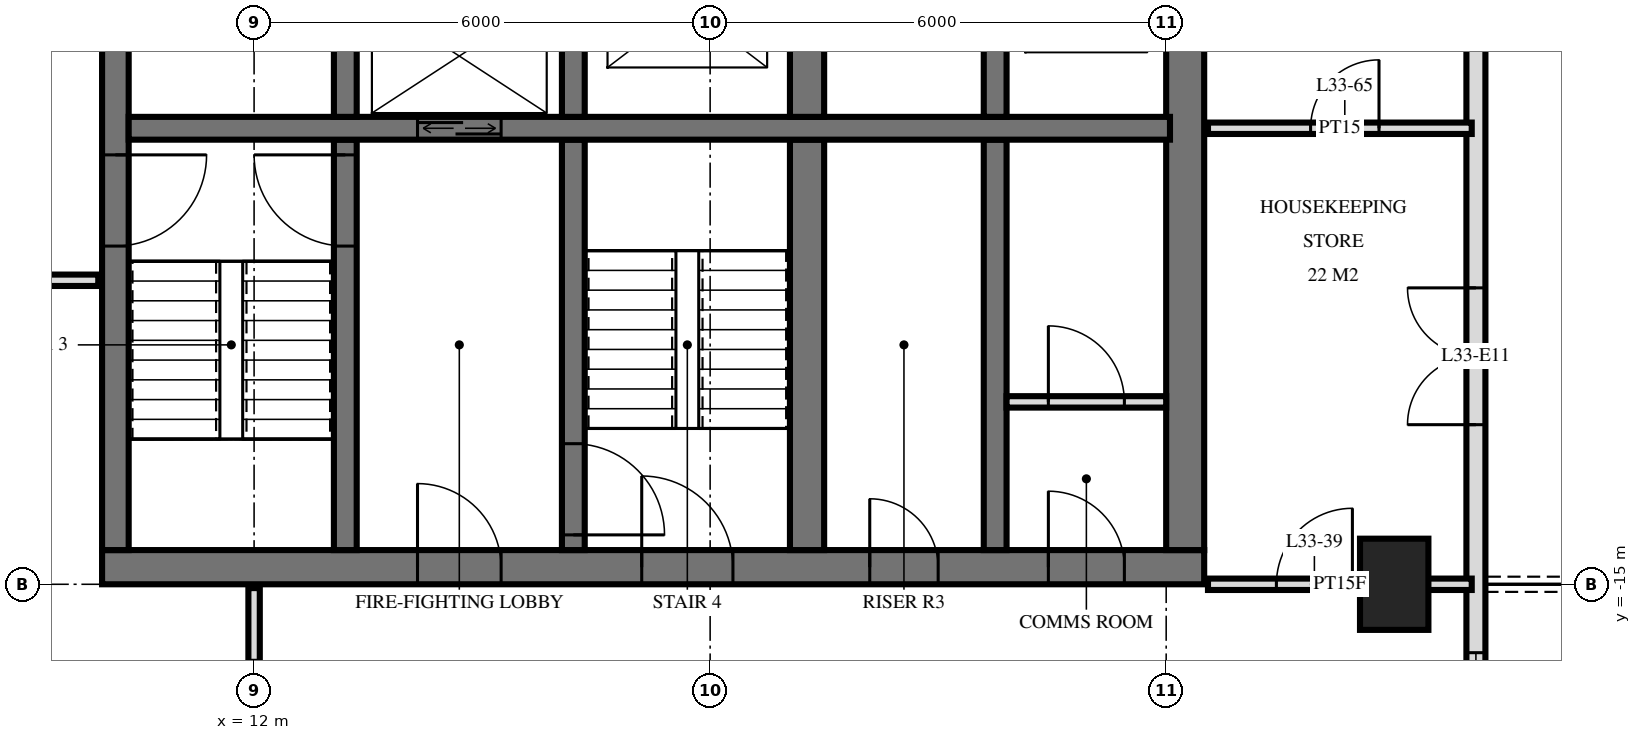
"""IFC4 building model, lengths in metres.
Left out: names, types, materials, properties, quantities, classifications, styles, units other than length and angle.
Written with IfcOpenShell. Run it as: python <this file> out.ifc"""

import sys

from ifc_helpers import new_model, si_unit, direction, frame, frame_2d, origin, origin_2d, place, context, subcontext, project, spatial, rectangle, extrude, element, fill, save


model = new_model("IFC4")
c1 = context("Model", 3, precision=1e-05, world=origin(), true_north=direction((0.0, 1.0)))
c2 = subcontext(c1, "Body", "Model", "MODEL_VIEW")
j1 = project(units=[si_unit("LENGTHUNIT", "METRE"), si_unit("PLANEANGLEUNIT", "RADIAN")], contexts=[c1])
p1 = place(None, origin())
s1 = spatial("IfcSite", under=j1, at=p1, CompositionType="ELEMENT")
p2 = place(p1, origin())
s2 = spatial("IfcBuilding", under=s1, at=p2, CompositionType="ELEMENT")
p3 = place(p2, frame((0.0, 0.0, 130.8)))
s3 = spatial("IfcBuildingStorey", under=s2, at=p3, CompositionType="ELEMENT", Elevation=130.8)
p4 = place(p3, frame((27.0, -15.0, 0.0), z_axis=(0.0, 0.0, 1.0), x_axis=(0.0, 1.0, 0.0)))
e1 = element("IfcColumn", 1, at=p4, inside=s3, PredefinedType="COLUMN", context=c2, shape_type="SweptSolid", body=[
    extrude(rectangle(XDim=1.2, YDim=0.9, at=origin_2d()), origin(), (0.0, 0.0, 1.0), 3.6),
])
p5 = place(p3, frame((10.0, -14.775, 0.0), z_axis=(0.0, 0.0, 1.0), x_axis=(1.0, 0.0, 0.0)))
e2 = element("IfcWall", 2, at=p5, inside=s3, PredefinedType="SHEAR", context=c2, shape_type="SweptSolid", body=[
    extrude(rectangle(XDim=14.5, YDim=0.45, at=frame_2d((7.25, 0.0))), origin(), (0.0, 0.0, 1.0), 3.6),
])
p6 = place(p5, frame((7.1, 0.0, 0.0)))
e3 = element("IfcOpeningElement", 3, at=p6, cuts=e2, PredefinedType="OPENING", context=c2, shape_type="SweptSolid", body=[
    extrude(rectangle(XDim=1.2, YDim=2.1, at=frame_2d((0.6, 1.05))), frame((0.0, 0.235, 0.0), z_axis=(0.0, -1.0, 0.0), x_axis=(1.0, 0.0, 0.0)), (0.0, 0.0, 1.0), 0.47),
])
p7 = place(p5, frame((4.15, 0.0, 0.0)))
e4 = element("IfcOpeningElement", 4, at=p7, cuts=e2, PredefinedType="OPENING", context=c2, shape_type="SweptSolid", body=[
    extrude(rectangle(XDim=1.1, YDim=2.1, at=frame_2d((0.55, 1.05))), frame((0.0, 0.235, 0.0), z_axis=(0.0, -1.0, 0.0), x_axis=(1.0, 0.0, 0.0)), (0.0, 0.0, 1.0), 0.47),
])
p8 = place(p5, frame((10.1, 0.0, 0.0)))
e5 = element("IfcOpeningElement", 5, at=p8, cuts=e2, PredefinedType="OPENING", context=c2, shape_type="SweptSolid", body=[
    extrude(rectangle(XDim=0.9, YDim=2.1, at=frame_2d((0.45, 1.05))), frame((0.0, 0.235, 0.0), z_axis=(0.0, -1.0, 0.0), x_axis=(1.0, 0.0, 0.0)), (0.0, 0.0, 1.0), 0.47),
])
p9 = place(p5, frame((12.45, 0.0, 0.0)))
e6 = element("IfcOpeningElement", 6, at=p9, cuts=e2, PredefinedType="OPENING", context=c2, shape_type="SweptSolid", body=[
    extrude(rectangle(XDim=1.0, YDim=2.1, at=frame_2d((0.5, 1.05))), frame((0.0, 0.235, 0.0), z_axis=(0.0, -1.0, 0.0), x_axis=(1.0, 0.0, 0.0)), (0.0, 0.0, 1.0), 0.47),
])
p10 = place(p3, frame((10.175, -14.55, 0.0), z_axis=(0.0, 0.0, 1.0), x_axis=(0.0, 1.0, 0.0)))
e7 = element("IfcWall", 7, at=p10, inside=s3, PredefinedType="SHEAR", context=c2, shape_type="SweptSolid", body=[
    extrude(rectangle(XDim=14.1, YDim=0.35, at=frame_2d((7.05, 0.0))), origin(), (0.0, 0.0, 1.0), 3.6),
])
p11 = place(p10, frame((8.4, 0.0, 0.0)))
e8 = element("IfcOpeningElement", 8, at=p11, cuts=e7, PredefinedType="OPENING", context=c2, shape_type="SweptSolid", body=[
    extrude(rectangle(XDim=1.4, YDim=2.4, at=frame_2d((0.7, 1.2))), frame((0.0, 0.185, 0.0), z_axis=(0.0, -1.0, 0.0), x_axis=(1.0, 0.0, 0.0)), (0.0, 0.0, 1.0), 0.37),
])
p12 = place(p10, frame((10.0, 0.0, 0.0)))
e9 = element("IfcOpeningElement", 9, at=p12, cuts=e7, PredefinedType="OPENING", context=c2, shape_type="SweptSolid", body=[
    extrude(rectangle(XDim=1.4, YDim=2.4, at=frame_2d((0.7, 1.2))), frame((0.0, 0.185, 0.0), z_axis=(0.0, -1.0, 0.0), x_axis=(1.0, 0.0, 0.0)), (0.0, 0.0, 1.0), 0.37),
])
p13 = place(p10, frame((4.0, 0.0, 0.0)))
e10 = element("IfcOpeningElement", 10, at=p13, cuts=e7, PredefinedType="OPENING", context=c2, shape_type="SweptSolid", body=[
    extrude(rectangle(XDim=1.2, YDim=2.1, at=frame_2d((0.6, 1.05))), frame((0.0, 0.185, 0.0), z_axis=(0.0, -1.0, 0.0), x_axis=(1.0, 0.0, 0.0)), (0.0, 0.0, 1.0), 0.37),
])
p14 = place(p3, frame((24.25, -14.55, 0.0), z_axis=(0.0, 0.0, 1.0), x_axis=(0.0, 1.0, 0.0)))
e11 = element("IfcWall", 11, at=p14, inside=s3, PredefinedType="SHEAR", context=c2, shape_type="SweptSolid", body=[
    extrude(rectangle(XDim=14.1, YDim=0.5, at=frame_2d((7.05, 0.0))), origin(), (0.0, 0.0, 1.0), 3.6),
])
p15 = place(p3, frame((10.35, -9.0, 0.0), z_axis=(0.0, 0.0, 1.0), x_axis=(1.0, 0.0, 0.0)))
e12 = element("IfcWall", 12, at=p15, inside=s3, PredefinedType="SHEAR", context=c2, shape_type="SweptSolid", body=[
    extrude(rectangle(XDim=13.7, YDim=0.3, at=frame_2d((6.85, 0.0))), origin(), (0.0, 0.0, 1.0), 3.6),
])
p16 = place(p15, frame((3.8, 0.0, 0.0)))
e13 = element("IfcOpeningElement", 13, at=p16, cuts=e12, PredefinedType="OPENING", context=c2, shape_type="SweptSolid", body=[
    extrude(rectangle(XDim=1.1, YDim=2.1, at=frame_2d((0.55, 1.05))), frame((0.0, 0.16, 0.0), z_axis=(0.0, -1.0, 0.0), x_axis=(1.0, 0.0, 0.0)), (0.0, 0.0, 1.0), 0.32),
])
p17 = place(p3, frame((13.2, -8.85, 0.0), z_axis=(0.0, 0.0, 1.0), x_axis=(0.0, 1.0, 0.0)))
e14 = element("IfcWall", 14, at=p17, inside=s3, PredefinedType="SHEAR", context=c2, shape_type="SweptSolid", body=[
    extrude(rectangle(XDim=2.3, YDim=0.3, at=frame_2d((1.15, 0.0))), origin(), (0.0, 0.0, 1.0), 3.6),
])
p18 = place(p3, frame((13.2, -14.55, 0.0), z_axis=(0.0, 0.0, 1.0), x_axis=(0.0, 1.0, 0.0)))
e15 = element("IfcWall", 15, at=p18, inside=s3, PredefinedType="SHEAR", context=c2, shape_type="SweptSolid", body=[
    extrude(rectangle(XDim=5.4, YDim=0.3, at=frame_2d((2.7, 0.0))), origin(), (0.0, 0.0, 1.0), 3.6),
])
p19 = place(p18, frame((4.0, 0.0, 0.0)))
e16 = element("IfcOpeningElement", 16, at=p19, cuts=e15, PredefinedType="OPENING", context=c2, shape_type="SweptSolid", body=[
    extrude(rectangle(XDim=1.2, YDim=2.1, at=frame_2d((0.6, 1.05))), frame((0.0, 0.16, 0.0), z_axis=(0.0, -1.0, 0.0), x_axis=(1.0, 0.0, 0.0)), (0.0, 0.0, 1.0), 0.32),
])
p20 = place(p3, frame((16.2, -8.85, 0.0), z_axis=(0.0, 0.0, 1.0), x_axis=(0.0, 1.0, 0.0)))
e17 = element("IfcWall", 17, at=p20, inside=s3, PredefinedType="SHEAR", context=c2, shape_type="SweptSolid", body=[
    extrude(rectangle(XDim=2.3, YDim=0.3, at=frame_2d((1.15, 0.0))), origin(), (0.0, 0.0, 1.0), 3.6),
])
p21 = place(p3, frame((16.2, -14.55, 0.0), z_axis=(0.0, 0.0, 1.0), x_axis=(0.0, 1.0, 0.0)))
e18 = element("IfcWall", 18, at=p21, inside=s3, PredefinedType="SHEAR", context=c2, shape_type="SweptSolid", body=[
    extrude(rectangle(XDim=5.4, YDim=0.3, at=frame_2d((2.7, 0.0))), origin(), (0.0, 0.0, 1.0), 3.6),
])
p22 = place(p21, frame((0.2, 0.0, 0.0)))
e19 = element("IfcOpeningElement", 19, at=p22, cuts=e18, PredefinedType="OPENING", context=c2, shape_type="SweptSolid", body=[
    extrude(rectangle(XDim=1.2, YDim=2.1, at=frame_2d((0.6, 1.05))), frame((0.0, 0.16, 0.0), z_axis=(0.0, -1.0, 0.0), x_axis=(1.0, 0.0, 0.0)), (0.0, 0.0, 1.0), 0.32),
])
p23 = place(p3, frame((19.275, -8.85, 0.0), z_axis=(0.0, 0.0, 1.0), x_axis=(0.0, 1.0, 0.0)))
e20 = element("IfcWall", 20, at=p23, inside=s3, PredefinedType="SHEAR", context=c2, shape_type="SweptSolid", body=[
    extrude(rectangle(XDim=2.3, YDim=0.45, at=frame_2d((1.15, 0.0))), origin(), (0.0, 0.0, 1.0), 3.6),
])
p24 = place(p3, frame((19.275, -14.55, 0.0), z_axis=(0.0, 0.0, 1.0), x_axis=(0.0, 1.0, 0.0)))
e21 = element("IfcWall", 21, at=p24, inside=s3, PredefinedType="SHEAR", context=c2, shape_type="SweptSolid", body=[
    extrude(rectangle(XDim=5.4, YDim=0.45, at=frame_2d((2.7, 0.0))), origin(), (0.0, 0.0, 1.0), 3.6),
])
p25 = place(p3, frame((21.75, -8.85, 0.0), z_axis=(0.0, 0.0, 1.0), x_axis=(0.0, 1.0, 0.0)))
e22 = element("IfcWall", 22, at=p25, inside=s3, PredefinedType="SHEAR", context=c2, shape_type="SweptSolid", body=[
    extrude(rectangle(XDim=2.3, YDim=0.3, at=frame_2d((1.15, 0.0))), origin(), (0.0, 0.0, 1.0), 3.6),
])
p26 = place(p3, frame((21.75, -14.55, 0.0), z_axis=(0.0, 0.0, 1.0), x_axis=(0.0, 1.0, 0.0)))
e23 = element("IfcWall", 23, at=p26, inside=s3, PredefinedType="SHEAR", context=c2, shape_type="SweptSolid", body=[
    extrude(rectangle(XDim=5.4, YDim=0.3, at=frame_2d((2.7, 0.0))), origin(), (0.0, 0.0, 1.0), 3.6),
])
p27 = place(p3, frame((28.075, -29.275, 0.0), z_axis=(0.0, 0.0, 1.0), x_axis=(0.0, 1.0, 0.0)))
e24 = element("IfcWall", 24, at=p27, inside=s3, PredefinedType="SOLIDWALL", context=c2, shape_type="SweptSolid", body=[
    extrude(rectangle(XDim=25.951, YDim=0.25, at=frame_2d((12.975, 0.0))), origin(), (0.0, 0.0, 1.0), 3.32),
])
p28 = place(p27, frame((0.575, 0.0, 0.0)))
e25 = element("IfcOpeningElement", 25, at=p28, cuts=e24, PredefinedType="OPENING", context=c2, shape_type="SweptSolid", body=[
    extrude(rectangle(XDim=1.8, YDim=2.4, at=frame_2d((0.9, 1.2))), frame((0.0, 0.135, 0.0), z_axis=(0.0, -1.0, 0.0), x_axis=(1.0, 0.0, 0.0)), (0.0, 0.0, 1.0), 0.27),
])
p29 = place(p27, frame((3.325, 0.0, 0.3)))
e26 = element("IfcOpeningElement", 26, at=p29, cuts=e24, PredefinedType="OPENING", context=c2, shape_type="SweptSolid", body=[
    extrude(rectangle(XDim=1.8, YDim=2.1, at=frame_2d((0.9, 1.05))), frame((0.0, 0.135, 0.0), z_axis=(0.0, -1.0, 0.0), x_axis=(1.0, 0.0, 0.0)), (0.0, 0.0, 1.0), 0.27),
])
p30 = place(p27, frame((8.275, 0.0, 0.0)))
e27 = element("IfcOpeningElement", 27, at=p30, cuts=e24, PredefinedType="OPENING", context=c2, shape_type="SweptSolid", body=[
    extrude(rectangle(XDim=1.8, YDim=2.4, at=frame_2d((0.9, 1.2))), frame((0.0, 0.135, 0.0), z_axis=(0.0, -1.0, 0.0), x_axis=(1.0, 0.0, 0.0)), (0.0, 0.0, 1.0), 0.27),
])
p31 = place(p27, frame((12.175, 0.0, 0.3)))
e28 = element("IfcOpeningElement", 28, at=p31, cuts=e24, PredefinedType="OPENING", context=c2, shape_type="SweptSolid", body=[
    extrude(rectangle(XDim=1.2, YDim=2.1, at=frame_2d((0.6, 1.05))), frame((0.0, 0.135, 0.0), z_axis=(0.0, -1.0, 0.0), x_axis=(1.0, 0.0, 0.0)), (0.0, 0.0, 1.0), 0.27),
])
p32 = place(p27, frame((16.375, 0.0, 0.0)))
e29 = element("IfcOpeningElement", 29, at=p32, cuts=e24, PredefinedType="OPENING", context=c2, shape_type="SweptSolid", body=[
    extrude(rectangle(XDim=1.8, YDim=2.4, at=frame_2d((0.9, 1.2))), frame((0.0, 0.135, 0.0), z_axis=(0.0, -1.0, 0.0), x_axis=(1.0, 0.0, 0.0)), (0.0, 0.0, 1.0), 0.27),
])
p33 = place(p3, frame((21.9, -12.6, 0.0), z_axis=(0.0, 0.0, 1.0), x_axis=(1.0, 0.0, 0.0)))
e30 = element("IfcWall", 30, at=p33, inside=s3, PredefinedType="PARTITIONING", context=c2, shape_type="SweptSolid", body=[
    extrude(rectangle(XDim=2.1, YDim=0.15, at=frame_2d((1.05, 0.0))), origin(), (0.0, 0.0, 1.0), 3.3),
])
p34 = place(p33, frame((0.55, 0.0, 0.0)))
e31 = element("IfcOpeningElement", 31, at=p34, cuts=e30, PredefinedType="OPENING", context=c2, shape_type="SweptSolid", body=[
    extrude(rectangle(XDim=1.0, YDim=2.1, at=frame_2d((0.5, 1.05))), frame((0.0, 0.085, 0.0), z_axis=(0.0, -1.0, 0.0), x_axis=(1.0, 0.0, 0.0)), (0.0, 0.0, 1.0), 0.17),
])
p35 = place(p3, frame((12.0, -18.0, 0.0), z_axis=(0.0, 0.0, 1.0), x_axis=(0.0, 1.0, 0.0)))
e32 = element("IfcWall", 32, at=p35, inside=s3, PredefinedType="PARTITIONING", context=c2, shape_type="SweptSolid", body=[
    extrude(rectangle(XDim=2.95, YDim=0.15, at=frame_2d((1.475, 0.0))), origin(), (0.0, 0.0, 1.0), 3.32),
])
p36 = place(p35, frame((1.0, 0.0, 0.0)))
e33 = element("IfcOpeningElement", 33, at=p36, cuts=e32, PredefinedType="OPENING", context=c2, shape_type="SweptSolid", body=[
    extrude(rectangle(XDim=1.0, YDim=2.1, at=frame_2d((0.5, 1.05))), frame((0.0, 0.085, 0.0), z_axis=(0.0, -1.0, 0.0), x_axis=(1.0, 0.0, 0.0)), (0.0, 0.0, 1.0), 0.17),
])
p37 = place(p3, frame((24.55, -15.0, 0.0), z_axis=(0.0, 0.0, 1.0), x_axis=(1.0, 0.0, 0.0)))
e34 = element("IfcWall", 34, at=p37, inside=s3, PredefinedType="PARTITIONING", context=c2, shape_type="SweptSolid", body=[
    extrude(rectangle(XDim=3.47, YDim=0.15, at=frame_2d((1.735, 0.0))), origin(), (0.0, 0.0, 1.0), 3.32),
])
p38 = place(p37, frame((0.9, 0.0, 0.0)))
e35 = element("IfcOpeningElement", 35, at=p38, cuts=e34, PredefinedType="OPENING", context=c2, shape_type="SweptSolid", body=[
    extrude(rectangle(XDim=1.0, YDim=2.1, at=frame_2d((0.5, 1.05))), frame((0.0, 0.085, 0.0), z_axis=(0.0, -1.0, 0.0), x_axis=(1.0, 0.0, 0.0)), (0.0, 0.0, 1.0), 0.17),
])
p39 = place(p3, frame((-9.95, -11.0, 0.0), z_axis=(0.0, 0.0, 1.0), x_axis=(1.0, 0.0, 0.0)))
e36 = element("IfcWall", 36, at=p39, inside=s3, PredefinedType="PARTITIONING", context=c2, shape_type="SweptSolid", body=[
    extrude(rectangle(XDim=19.9, YDim=0.15, at=frame_2d((9.95, 0.0))), origin(), (0.0, 0.0, 1.0), 3.32),
])
p40 = place(p39, frame((9.45, 0.0, 0.0)))
e37 = element("IfcOpeningElement", 37, at=p40, cuts=e36, PredefinedType="OPENING", context=c2, shape_type="SweptSolid", body=[
    extrude(rectangle(XDim=1.0, YDim=2.1, at=frame_2d((0.5, 1.05))), frame((0.0, 0.085, 0.0), z_axis=(0.0, -1.0, 0.0), x_axis=(1.0, 0.0, 0.0)), (0.0, 0.0, 1.0), 0.17),
])
p41 = place(p39, frame((3.45, 0.0, 0.0)))
e38 = element("IfcOpeningElement", 38, at=p41, cuts=e36, PredefinedType="OPENING", context=c2, shape_type="SweptSolid", body=[
    extrude(rectangle(XDim=1.0, YDim=2.1, at=frame_2d((0.5, 1.05))), frame((0.0, 0.085, 0.0), z_axis=(0.0, -1.0, 0.0), x_axis=(1.0, 0.0, 0.0)), (0.0, 0.0, 1.0), 0.17),
])
p42 = place(p3, frame((24.55, -9.0, 0.0), z_axis=(0.0, 0.0, 1.0), x_axis=(1.0, 0.0, 0.0)))
e39 = element("IfcWall", 39, at=p42, inside=s3, PredefinedType="PARTITIONING", context=c2, shape_type="SweptSolid", body=[
    extrude(rectangle(XDim=3.47, YDim=0.15, at=frame_2d((1.735, 0.0))), origin(), (0.0, 0.0, 1.0), 3.32),
])
p43 = place(p42, frame((1.35, 0.0, 0.0)))
e40 = element("IfcOpeningElement", 40, at=p43, cuts=e39, PredefinedType="OPENING", context=c2, shape_type="SweptSolid", body=[
    extrude(rectangle(XDim=0.9, YDim=2.1, at=frame_2d((0.45, 1.05))), frame((0.0, 0.085, 0.0), z_axis=(0.0, -1.0, 0.0), x_axis=(1.0, 0.0, 0.0)), (0.0, 0.0, 1.0), 0.17),
])
p44 = place(p31, origin())
e41 = element("IfcWindow", 41, at=p44, inside=s3, PartitioningType="SINGLE_PANEL", PredefinedType="WINDOW", context=c2, shape_type="SweptSolid", body=[
    extrude(rectangle(XDim=1.2, YDim=2.1, at=frame_2d((0.6, 1.05))), frame((0.0, 0.03, 0.0), z_axis=(0.0, -1.0, 0.0), x_axis=(1.0, 0.0, 0.0)), (0.0, 0.0, 1.0), 0.06),
])
fill(e28, e41)
p45 = place(p32, origin())
e42 = element("IfcDoor", 42, at=p45, inside=s3, OperationType="DOUBLE_DOOR_SINGLE_SWING", PredefinedType="DOOR", context=c2, shape_type="SweptSolid", body=[
    extrude(rectangle(XDim=1.8, YDim=2.4, at=frame_2d((0.9, 1.2))), frame((0.0, 0.025, 0.0), z_axis=(0.0, -1.0, 0.0), x_axis=(1.0, 0.0, 0.0)), (0.0, 0.0, 1.0), 0.05),
])
fill(e29, e42)
p46 = place(p16, origin())
e43 = element("IfcDoor", 43, at=p46, inside=s3, OperationType="DOUBLE_DOOR_SLIDING", PredefinedType="USERDEFINED", context=c2, shape_type="SweptSolid", body=[
    extrude(rectangle(XDim=1.1, YDim=2.1, at=frame_2d((0.55, 1.05))), frame((0.0, 0.025, 0.0), z_axis=(0.0, -1.0, 0.0), x_axis=(1.0, 0.0, 0.0)), (0.0, 0.0, 1.0), 0.05),
])
fill(e13, e43)
p47 = place(p13, frame((0.6, 0.0, 0.0), z_axis=(0.0, 0.0, 1.0), x_axis=(-1.0, 0.0, 0.0)))
e44 = element("IfcDoor", 44, at=p47, inside=s3, OperationType="SINGLE_SWING_RIGHT", PredefinedType="DOOR", context=c2, shape_type="SweptSolid", body=[
    extrude(rectangle(XDim=1.2, YDim=2.1, at=frame_2d((0.0, 1.05))), frame((0.0, -0.025, 0.0), z_axis=(0.0, 1.0, 0.0), x_axis=(-1.0, 0.0, 0.0)), (0.0, 0.0, 1.0), 0.05),
])
fill(e10, e44)
p48 = place(p6, origin())
e45 = element("IfcDoor", 45, at=p48, inside=s3, OperationType="SINGLE_SWING_RIGHT", PredefinedType="DOOR", context=c2, shape_type="SweptSolid", body=[
    extrude(rectangle(XDim=1.2, YDim=2.1, at=frame_2d((0.6, 1.05))), frame((0.0, 0.025, 0.0), z_axis=(0.0, -1.0, 0.0), x_axis=(1.0, 0.0, 0.0)), (0.0, 0.0, 1.0), 0.05),
])
fill(e3, e45)
p49 = place(p7, origin())
e46 = element("IfcDoor", 46, at=p49, inside=s3, OperationType="SINGLE_SWING_RIGHT", PredefinedType="DOOR", context=c2, shape_type="SweptSolid", body=[
    extrude(rectangle(XDim=1.1, YDim=2.1, at=frame_2d((0.55, 1.05))), frame((0.0, 0.025, 0.0), z_axis=(0.0, -1.0, 0.0), x_axis=(1.0, 0.0, 0.0)), (0.0, 0.0, 1.0), 0.05),
])
fill(e4, e46)
p50 = place(p8, origin())
e47 = element("IfcDoor", 47, at=p50, inside=s3, OperationType="SINGLE_SWING_RIGHT", PredefinedType="DOOR", context=c2, shape_type="SweptSolid", body=[
    extrude(rectangle(XDim=0.9, YDim=2.1, at=frame_2d((0.45, 1.05))), frame((0.0, 0.025, 0.0), z_axis=(0.0, -1.0, 0.0), x_axis=(1.0, 0.0, 0.0)), (0.0, 0.0, 1.0), 0.05),
])
fill(e5, e47)
p51 = place(p9, origin())
e48 = element("IfcDoor", 48, at=p51, inside=s3, OperationType="SINGLE_SWING_RIGHT", PredefinedType="DOOR", context=c2, shape_type="SweptSolid", body=[
    extrude(rectangle(XDim=1.0, YDim=2.1, at=frame_2d((0.5, 1.05))), frame((0.0, 0.025, 0.0), z_axis=(0.0, -1.0, 0.0), x_axis=(1.0, 0.0, 0.0)), (0.0, 0.0, 1.0), 0.05),
])
fill(e6, e48)
p52 = place(p19, origin())
e49 = element("IfcDoor", 49, at=p52, inside=s3, OperationType="SINGLE_SWING_LEFT", PredefinedType="DOOR", context=c2, shape_type="SweptSolid", body=[
    extrude(rectangle(XDim=1.2, YDim=2.1, at=frame_2d((0.6, 1.05))), frame((0.0, 0.025, 0.0), z_axis=(0.0, -1.0, 0.0), x_axis=(1.0, 0.0, 0.0)), (0.0, 0.0, 1.0), 0.05),
])
fill(e16, e49)
p53 = place(p22, frame((0.6, 0.0, 0.0), z_axis=(0.0, 0.0, 1.0), x_axis=(-1.0, 0.0, 0.0)))
e50 = element("IfcDoor", 50, at=p53, inside=s3, OperationType="SINGLE_SWING_LEFT", PredefinedType="DOOR", context=c2, shape_type="SweptSolid", body=[
    extrude(rectangle(XDim=1.2, YDim=2.1, at=frame_2d((0.0, 1.05))), frame((0.0, -0.025, 0.0), z_axis=(0.0, 1.0, 0.0), x_axis=(-1.0, 0.0, 0.0)), (0.0, 0.0, 1.0), 0.05),
])
fill(e19, e50)
p54 = place(p34, origin())
e51 = element("IfcDoor", 51, at=p54, inside=s3, OperationType="SINGLE_SWING_RIGHT", PredefinedType="DOOR", context=c2, shape_type="SweptSolid", body=[
    extrude(rectangle(XDim=1.0, YDim=2.1, at=frame_2d((0.5, 1.05))), frame((0.0, 0.025, 0.0), z_axis=(0.0, -1.0, 0.0), x_axis=(1.0, 0.0, 0.0)), (0.0, 0.0, 1.0), 0.05),
])
fill(e31, e51)
p55 = place(p38, origin())
e52 = element("IfcDoor", 52, at=p55, inside=s3, OperationType="SINGLE_SWING_LEFT", PredefinedType="DOOR", context=c2, shape_type="SweptSolid", body=[
    extrude(rectangle(XDim=1.0, YDim=2.1, at=frame_2d((0.5, 1.05))), frame((0.0, 0.025, 0.0), z_axis=(0.0, -1.0, 0.0), x_axis=(1.0, 0.0, 0.0)), (0.0, 0.0, 1.0), 0.05),
])
fill(e35, e52)
p56 = place(p43, origin())
e53 = element("IfcDoor", 53, at=p56, inside=s3, OperationType="SINGLE_SWING_LEFT", PredefinedType="DOOR", context=c2, shape_type="SweptSolid", body=[
    extrude(rectangle(XDim=0.9, YDim=2.1, at=frame_2d((0.45, 1.05))), frame((0.0, 0.025, 0.0), z_axis=(0.0, -1.0, 0.0), x_axis=(1.0, 0.0, 0.0)), (0.0, 0.0, 1.0), 0.05),
])
fill(e40, e53)
save(model, sys.argv[1])
